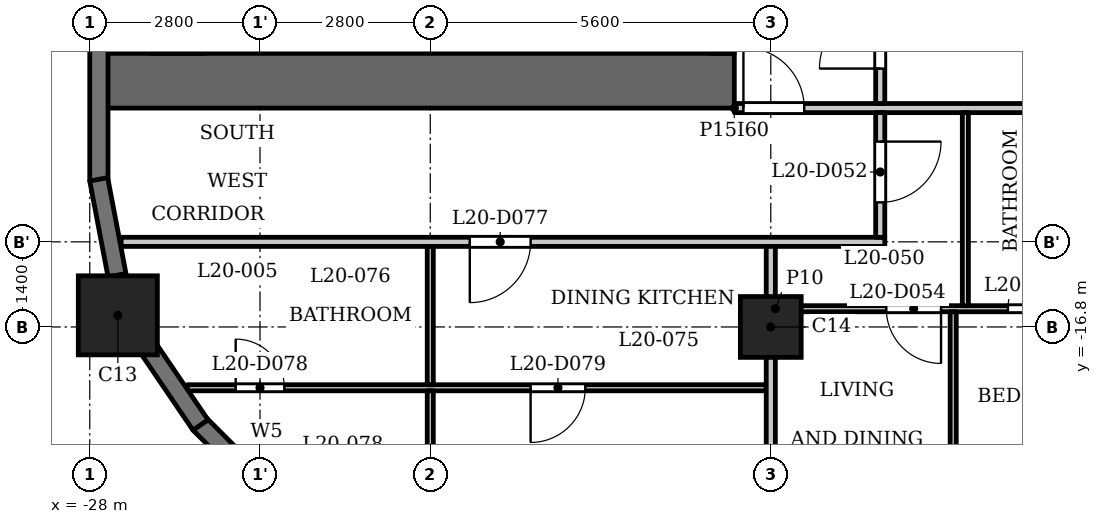
"""IFC4 building model, lengths in metres.
Left out: names, types, materials, properties, quantities, classifications, styles, units other than length and angle.
Written with IfcOpenShell. Run it as: python <this file> out.ifc"""

import sys

from ifc_helpers import new_model, si_unit, direction, frame, frame_2d, origin, origin_2d, place, context, subcontext, project, spatial, rectangle, extrude, element, fill, save


model = new_model("IFC4")
c1 = context("Model", 3, precision=1e-05, world=origin(), true_north=direction((0.0, 1.0)))
c2 = subcontext(c1, "Body", "Model", "MODEL_VIEW")
j1 = project(units=[si_unit("LENGTHUNIT", "METRE"), si_unit("PLANEANGLEUNIT", "RADIAN")], contexts=[c1])
p1 = place(None, origin())
s1 = spatial("IfcSite", under=j1, at=p1, CompositionType="ELEMENT")
p2 = place(p1, origin())
s2 = spatial("IfcBuilding", under=s1, at=p2, CompositionType="ELEMENT")
p3 = place(p2, frame((0.0, 0.0, 83.3)))
s3 = spatial("IfcBuildingStorey", under=s2, at=p3, CompositionType="ELEMENT", Elevation=83.3)
p4 = place(p3, frame((-27.538, -16.609, 0.0), z_axis=(0.0, 0.0, 1.0), x_axis=(1.0, 0.0, 0.0)))
e1 = element("IfcColumn", 1, at=p4, inside=s3, PredefinedType="COLUMN", context=c2, shape_type="SweptSolid", body=[
    extrude(rectangle(XDim=1.3, YDim=1.3, at=origin_2d()), origin(), (0.0, 0.0, 1.0), 3.5),
])
p5 = place(p3, frame((-16.8, -16.8, 0.0), z_axis=(0.0, 0.0, 1.0), x_axis=(1.0, 0.0, 0.0)))
e2 = element("IfcColumn", 2, at=p5, inside=s3, PredefinedType="COLUMN", context=c2, shape_type="SweptSolid", body=[
    extrude(rectangle(XDim=1.0, YDim=1.0, at=origin_2d()), origin(), (0.0, 0.0, 1.0), 3.5),
])
p6 = place(p3, frame((-26.197, -18.391, 0.0), z_axis=(0.0, 0.0, 1.0), x_axis=(0.707058908279, -0.707154650853, 0.0)))
e3 = element("IfcWall", 3, at=p6, inside=s3, PredefinedType="SOLIDWALL", context=c2, shape_type="SweptSolid", body=[
    extrude(rectangle(XDim=2.55, YDim=0.3, at=frame_2d((1.275, 0.0))), origin(), (0.0, 0.0, 1.0), 2.4),
])
p7 = place(p6, frame((0.875, 0.0, 0.6)))
e4 = element("IfcOpeningElement", 4, at=p7, cuts=e3, PredefinedType="OPENING", context=c2, shape_type="SweptSolid", body=[
    extrude(rectangle(XDim=0.8, YDim=1.55, at=frame_2d((0.4, 0.775))), frame((0.0, 0.16, 0.0), z_axis=(0.0, -1.0, 0.0), x_axis=(1.0, 0.0, 0.0)), (0.0, 0.0, 1.0), 0.32),
])
p8 = place(p3, frame((-27.85, -11.85, 0.0), z_axis=(0.0, 0.0, 1.0), x_axis=(0.0, -1.0, 0.0)))
e5 = element("IfcWall", 5, at=p8, inside=s3, PredefinedType="SOLIDWALL", context=c2, shape_type="SweptSolid", body=[
    extrude(rectangle(XDim=2.55, YDim=0.3, at=frame_2d((1.275, 0.0))), origin(), (0.0, 0.0, 1.0), 2.4),
])
for number, where, z_axis, x_axis in (
    (6, (-27.853, -14.372, 0.0), (0.0, 0.0, 1.0), (0.187, -0.982, 0.0)),
    (7, (-27.082, -17.084, 0.0), (0.0, 0.0, 1.0), (0.562, -0.827, 0.0)),
):
    element("IfcWall", number, at=place(p3, frame(where, z_axis=z_axis, x_axis=x_axis)), inside=s3, PredefinedType="SOLIDWALL", context=c2, shape_type="SweptSolid", body=[
        extrude(rectangle(XDim=1.606, YDim=0.3, at=frame_2d((0.803, 0.0))), origin(), (0.0, 0.0, 1.0), 2.4),
    ])
p9 = place(p3, frame((-17.4, -12.75, 0.0), z_axis=(0.0, 0.0, 1.0), x_axis=(-1.0, 0.0, 0.0)))
e8 = element("IfcWall", 8, at=p9, inside=s3, PredefinedType="SHEAR", context=c2, shape_type="SweptSolid", body=[
    extrude(rectangle(XDim=10.4, YDim=0.9, at=frame_2d((5.2, 0.0))), origin(), (0.0, 0.0, 1.0), 3.2),
])
p10 = place(p3, frame((-17.6, -12.3, 0.0), z_axis=(0.0, 0.0, 1.0), x_axis=(0.0, 1.0, 0.0)))
e9 = element("IfcWall", 9, at=p10, inside=s3, PredefinedType="SHEAR", context=c2, shape_type="SweptSolid", body=[
    extrude(rectangle(XDim=24.6, YDim=0.4, at=frame_2d((12.3, 0.0))), origin(), (0.0, 0.0, 1.0), 3.2),
])
p11 = place(p10, frame((6.0, 0.0, 0.0)))
e10 = element("IfcOpeningElement", 10, at=p11, cuts=e9, PredefinedType="OPENING", context=c2, shape_type="SweptSolid", body=[
    extrude(rectangle(XDim=1.1, YDim=2.1, at=frame_2d((0.55, 1.05))), frame((0.0, 0.21, 0.0), z_axis=(0.0, -1.0, 0.0), x_axis=(1.0, 0.0, 0.0)), (0.0, 0.0, 1.0), 0.42),
])
p12 = place(p10, frame((8.4, 0.0, 0.0)))
e11 = element("IfcOpeningElement", 11, at=p12, cuts=e9, PredefinedType="OPENING", context=c2, shape_type="SweptSolid", body=[
    extrude(rectangle(XDim=1.1, YDim=2.1, at=frame_2d((0.55, 1.05))), frame((0.0, 0.21, 0.0), z_axis=(0.0, -1.0, 0.0), x_axis=(1.0, 0.0, 0.0)), (0.0, 0.0, 1.0), 0.42),
])
p13 = place(p10, frame((10.8, 0.0, 0.0)))
e12 = element("IfcOpeningElement", 12, at=p13, cuts=e9, PredefinedType="OPENING", context=c2, shape_type="SweptSolid", body=[
    extrude(rectangle(XDim=1.1, YDim=2.1, at=frame_2d((0.55, 1.05))), frame((0.0, 0.21, 0.0), z_axis=(0.0, -1.0, 0.0), x_axis=(1.0, 0.0, 0.0)), (0.0, 0.0, 1.0), 0.42),
])
p14 = place(p10, frame((16.75, 0.0, 0.0)))
e13 = element("IfcOpeningElement", 13, at=p14, cuts=e9, PredefinedType="OPENING", context=c2, shape_type="SweptSolid", body=[
    extrude(rectangle(XDim=0.9, YDim=2.1, at=frame_2d((0.45, 1.05))), frame((0.0, 0.21, 0.0), z_axis=(0.0, -1.0, 0.0), x_axis=(1.0, 0.0, 0.0)), (0.0, 0.0, 1.0), 0.42),
])
p15 = place(p10, frame((22.8, 0.0, 0.0)))
e14 = element("IfcOpeningElement", 14, at=p15, cuts=e9, PredefinedType="OPENING", context=c2, shape_type="SweptSolid", body=[
    extrude(rectangle(XDim=1.1, YDim=2.1, at=frame_2d((0.55, 1.05))), frame((0.0, 0.21, 0.0), z_axis=(0.0, -1.0, 0.0), x_axis=(1.0, 0.0, 0.0)), (0.0, 0.0, 1.0), 0.42),
])
p16 = place(p10, frame((0.7, 0.0, 0.0)))
e15 = element("IfcOpeningElement", 15, at=p16, cuts=e9, PredefinedType="OPENING", context=c2, shape_type="SweptSolid", body=[
    extrude(rectangle(XDim=1.1, YDim=2.1, at=frame_2d((0.55, 1.05))), frame((0.0, 0.21, 0.0), z_axis=(0.0, -1.0, 0.0), x_axis=(1.0, 0.0, 0.0)), (0.0, 0.0, 1.0), 0.42),
])
p17 = place(p10, frame((12.775, 0.0, 0.0)))
e16 = element("IfcOpeningElement", 16, at=p17, cuts=e9, PredefinedType="OPENING", context=c2, shape_type="SweptSolid", body=[
    extrude(rectangle(XDim=1.8, YDim=2.1, at=frame_2d((0.9, 1.05))), frame((0.0, 0.21, 0.0), z_axis=(0.0, -1.0, 0.0), x_axis=(1.0, 0.0, 0.0)), (0.0, 0.0, 1.0), 0.42),
])
p18 = place(p3, frame((-26.55, -12.3, 0.0), z_axis=(0.0, 0.0, 1.0), x_axis=(0.0, 1.0, 0.0)))
e17 = element("IfcWall", 17, at=p18, inside=s3, PredefinedType="SHEAR", context=c2, shape_type="SweptSolid", body=[
    extrude(rectangle(XDim=24.6, YDim=0.9, at=frame_2d((12.3, 0.0))), origin(), (0.0, 0.0, 1.0), 3.2),
])
p19 = place(p3, frame((-23.55, -12.3, 0.0), z_axis=(0.0, 0.0, 1.0), x_axis=(0.0, 1.0, 0.0)))
e18 = element("IfcWall", 18, at=p19, inside=s3, PredefinedType="PARTITIONING", context=c2, shape_type="SweptSolid", body=[
    extrude(rectangle(XDim=2.5, YDim=0.2, at=frame_2d((1.25, 0.0))), origin(), (0.0, 0.0, 1.0), 3.2),
])
p20 = place(p19, frame((0.8, 0.0, 0.0)))
e19 = element("IfcOpeningElement", 19, at=p20, cuts=e18, PredefinedType="OPENING", context=c2, shape_type="SweptSolid", body=[
    extrude(rectangle(XDim=0.9, YDim=2.1, at=frame_2d((0.45, 1.05))), frame((0.0, 0.11, 0.0), z_axis=(0.0, -1.0, 0.0), x_axis=(1.0, 0.0, 0.0)), (0.0, 0.0, 1.0), 0.22),
])
p21 = place(p3, frame((-26.394, -17.8, 0.0), z_axis=(0.0, 0.0, 1.0), x_axis=(1.0, 0.0, 0.0)))
e20 = element("IfcWall", 20, at=p21, inside=s3, PredefinedType="PARTITIONING", context=c2, shape_type="SweptSolid", body=[
    extrude(rectangle(XDim=9.519, YDim=0.1, at=frame_2d((4.76, 0.0))), origin(), (0.0, 0.0, 1.0), 3.2),
])
p22 = place(p21, frame((0.794, 0.0, 0.0)))
e21 = element("IfcOpeningElement", 21, at=p22, cuts=e20, PredefinedType="OPENING", context=c2, shape_type="SweptSolid", body=[
    extrude(rectangle(XDim=0.8, YDim=2.1, at=frame_2d((0.4, 1.05))), frame((0.0, 0.06, 0.0), z_axis=(0.0, -1.0, 0.0), x_axis=(1.0, 0.0, 0.0)), (0.0, 0.0, 1.0), 0.12),
])
p23 = place(p21, frame((5.644, 0.0, 0.0)))
e22 = element("IfcOpeningElement", 22, at=p23, cuts=e20, PredefinedType="OPENING", context=c2, shape_type="SweptSolid", body=[
    extrude(rectangle(XDim=0.9, YDim=2.1, at=frame_2d((0.45, 1.05))), frame((0.0, 0.06, 0.0), z_axis=(0.0, -1.0, 0.0), x_axis=(1.0, 0.0, 0.0)), (0.0, 0.0, 1.0), 0.12),
])
p24 = place(p3, frame((-16.725, -16.5, 0.0), z_axis=(0.0, 0.0, 1.0), x_axis=(1.0, 0.0, 0.0)))
e23 = element("IfcWall", 23, at=p24, inside=s3, PredefinedType="PARTITIONING", context=c2, shape_type="SweptSolid", body=[
    extrude(rectangle(XDim=33.45, YDim=0.1, at=frame_2d((16.725, 0.0))), origin(), (0.0, 0.0, 1.0), 3.2),
])
p25 = place(p24, frame((3.825, 0.0, 0.0)))
e24 = element("IfcOpeningElement", 24, at=p25, cuts=e23, PredefinedType="OPENING", context=c2, shape_type="SweptSolid", body=[
    extrude(rectangle(XDim=0.8, YDim=2.1, at=frame_2d((0.4, 1.05))), frame((0.0, 0.06, 0.0), z_axis=(0.0, -1.0, 0.0), x_axis=(1.0, 0.0, 0.0)), (0.0, 0.0, 1.0), 0.12),
])
p26 = place(p24, frame((1.825, 0.0, 0.0)))
e25 = element("IfcOpeningElement", 25, at=p26, cuts=e23, PredefinedType="OPENING", context=c2, shape_type="SweptSolid", body=[
    extrude(rectangle(XDim=0.9, YDim=2.1, at=frame_2d((0.45, 1.05))), frame((0.0, 0.06, 0.0), z_axis=(0.0, -1.0, 0.0), x_axis=(1.0, 0.0, 0.0)), (0.0, 0.0, 1.0), 0.12),
])
p27 = place(p24, frame((9.675, 0.0, 0.0)))
e26 = element("IfcOpeningElement", 26, at=p27, cuts=e23, PredefinedType="OPENING", context=c2, shape_type="SweptSolid", body=[
    extrude(rectangle(XDim=0.8, YDim=2.1, at=frame_2d((0.4, 1.05))), frame((0.0, 0.06, 0.0), z_axis=(0.0, -1.0, 0.0), x_axis=(1.0, 0.0, 0.0)), (0.0, 0.0, 1.0), 0.12),
])
p28 = place(p24, frame((6.425, 0.0, 0.0)))
e27 = element("IfcOpeningElement", 27, at=p28, cuts=e23, PredefinedType="OPENING", context=c2, shape_type="SweptSolid", body=[
    extrude(rectangle(XDim=0.9, YDim=2.1, at=frame_2d((0.45, 1.05))), frame((0.0, 0.06, 0.0), z_axis=(0.0, -1.0, 0.0), x_axis=(1.0, 0.0, 0.0)), (0.0, 0.0, 1.0), 0.12),
])
p29 = place(p24, frame((15.275, 0.0, 0.0)))
e28 = element("IfcOpeningElement", 28, at=p29, cuts=e23, PredefinedType="OPENING", context=c2, shape_type="SweptSolid", body=[
    extrude(rectangle(XDim=0.8, YDim=2.1, at=frame_2d((0.4, 1.05))), frame((0.0, 0.06, 0.0), z_axis=(0.0, -1.0, 0.0), x_axis=(1.0, 0.0, 0.0)), (0.0, 0.0, 1.0), 0.12),
])
p30 = place(p24, frame((12.025, 0.0, 0.0)))
e29 = element("IfcOpeningElement", 29, at=p30, cuts=e23, PredefinedType="OPENING", context=c2, shape_type="SweptSolid", body=[
    extrude(rectangle(XDim=0.9, YDim=2.1, at=frame_2d((0.45, 1.05))), frame((0.0, 0.06, 0.0), z_axis=(0.0, -1.0, 0.0), x_axis=(1.0, 0.0, 0.0)), (0.0, 0.0, 1.0), 0.12),
])
p31 = place(p24, frame((20.875, 0.0, 0.0)))
e30 = element("IfcOpeningElement", 30, at=p31, cuts=e23, PredefinedType="OPENING", context=c2, shape_type="SweptSolid", body=[
    extrude(rectangle(XDim=0.8, YDim=2.1, at=frame_2d((0.4, 1.05))), frame((0.0, 0.06, 0.0), z_axis=(0.0, -1.0, 0.0), x_axis=(1.0, 0.0, 0.0)), (0.0, 0.0, 1.0), 0.12),
])
p32 = place(p24, frame((18.625, 0.0, 0.0)))
e31 = element("IfcOpeningElement", 31, at=p32, cuts=e23, PredefinedType="OPENING", context=c2, shape_type="SweptSolid", body=[
    extrude(rectangle(XDim=0.9, YDim=2.1, at=frame_2d((0.45, 1.05))), frame((0.0, 0.06, 0.0), z_axis=(0.0, -1.0, 0.0), x_axis=(1.0, 0.0, 0.0)), (0.0, 0.0, 1.0), 0.12),
])
p33 = place(p24, frame((23.875, 0.0, 0.0)))
e32 = element("IfcOpeningElement", 32, at=p33, cuts=e23, PredefinedType="OPENING", context=c2, shape_type="SweptSolid", body=[
    extrude(rectangle(XDim=0.8, YDim=2.1, at=frame_2d((0.4, 1.05))), frame((0.0, 0.06, 0.0), z_axis=(0.0, -1.0, 0.0), x_axis=(1.0, 0.0, 0.0)), (0.0, 0.0, 1.0), 0.12),
])
p34 = place(p24, frame((26.225, 0.0, 0.0)))
e33 = element("IfcOpeningElement", 33, at=p34, cuts=e23, PredefinedType="OPENING", context=c2, shape_type="SweptSolid", body=[
    extrude(rectangle(XDim=0.9, YDim=2.1, at=frame_2d((0.45, 1.05))), frame((0.0, 0.06, 0.0), z_axis=(0.0, -1.0, 0.0), x_axis=(1.0, 0.0, 0.0)), (0.0, 0.0, 1.0), 0.12),
])
p35 = place(p24, frame((28.575, 0.0, 0.0)))
e34 = element("IfcOpeningElement", 34, at=p35, cuts=e23, PredefinedType="OPENING", context=c2, shape_type="SweptSolid", body=[
    extrude(rectangle(XDim=0.9, YDim=2.1, at=frame_2d((0.45, 1.05))), frame((0.0, 0.06, 0.0), z_axis=(0.0, -1.0, 0.0), x_axis=(1.0, 0.0, 0.0)), (0.0, 0.0, 1.0), 0.12),
])
p36 = place(p24, frame((30.675, 0.0, 0.0)))
e35 = element("IfcOpeningElement", 35, at=p36, cuts=e23, PredefinedType="OPENING", context=c2, shape_type="SweptSolid", body=[
    extrude(rectangle(XDim=0.9, YDim=2.1, at=frame_2d((0.45, 1.05))), frame((0.0, 0.06, 0.0), z_axis=(0.0, -1.0, 0.0), x_axis=(1.0, 0.0, 0.0)), (0.0, 0.0, 1.0), 0.12),
])
p37 = place(p3, frame((-27.484, -15.4, 0.0), z_axis=(0.0, 0.0, 1.0), x_axis=(1.0, 0.0, 0.0)))
e36 = element("IfcWall", 36, at=p37, inside=s3, PredefinedType="PARTITIONING", context=c2, shape_type="SweptSolid", body=[
    extrude(rectangle(XDim=12.559, YDim=0.15, at=frame_2d((6.279, 0.0))), origin(), (0.0, 0.0, 1.0), 3.2),
])
p38 = place(p37, frame((5.734, 0.0, 0.0)))
e37 = element("IfcOpeningElement", 37, at=p38, cuts=e36, PredefinedType="OPENING", context=c2, shape_type="SweptSolid", body=[
    extrude(rectangle(XDim=1.0, YDim=2.1, at=frame_2d((0.5, 1.05))), frame((0.0, 0.085, 0.0), z_axis=(0.0, -1.0, 0.0), x_axis=(1.0, 0.0, 0.0)), (0.0, 0.0, 1.0), 0.17),
])
p39 = place(p3, frame((-17.4, -13.2, 0.0), z_axis=(0.0, 0.0, 1.0), x_axis=(1.0, 0.0, 0.0)))
e38 = element("IfcWall", 38, at=p39, inside=s3, PredefinedType="PARTITIONING", context=c2, shape_type="SweptSolid", body=[
    extrude(rectangle(XDim=34.8, YDim=0.15, at=frame_2d((17.4, 0.0))), origin(), (0.0, 0.0, 1.0), 3.2),
])
p40 = place(p39, frame((0.15, 0.0, 0.0)))
e39 = element("IfcOpeningElement", 39, at=p40, cuts=e38, PredefinedType="OPENING", context=c2, shape_type="SweptSolid", body=[
    extrude(rectangle(XDim=1.0, YDim=2.1, at=frame_2d((0.5, 1.05))), frame((0.0, 0.085, 0.0), z_axis=(0.0, -1.0, 0.0), x_axis=(1.0, 0.0, 0.0)), (0.0, 0.0, 1.0), 0.17),
])
p41 = place(p39, frame((33.55, 0.0, 0.0)))
e40 = element("IfcOpeningElement", 40, at=p41, cuts=e38, PredefinedType="OPENING", context=c2, shape_type="SweptSolid", body=[
    extrude(rectangle(XDim=1.0, YDim=2.1, at=frame_2d((0.5, 1.05))), frame((0.0, 0.085, 0.0), z_axis=(0.0, -1.0, 0.0), x_axis=(1.0, 0.0, 0.0)), (0.0, 0.0, 1.0), 0.17),
])
p42 = place(p39, frame((7.35, 0.0, 0.0)))
e41 = element("IfcOpeningElement", 41, at=p42, cuts=e38, PredefinedType="OPENING", context=c2, shape_type="SweptSolid", body=[
    extrude(rectangle(XDim=1.0, YDim=2.1, at=frame_2d((0.5, 1.05))), frame((0.0, 0.085, 0.0), z_axis=(0.0, -1.0, 0.0), x_axis=(1.0, 0.0, 0.0)), (0.0, 0.0, 1.0), 0.17),
])
p43 = place(p39, frame((13.7, 0.0, 0.0)))
e42 = element("IfcOpeningElement", 42, at=p43, cuts=e38, PredefinedType="OPENING", context=c2, shape_type="SweptSolid", body=[
    extrude(rectangle(XDim=1.0, YDim=2.1, at=frame_2d((0.5, 1.05))), frame((0.0, 0.085, 0.0), z_axis=(0.0, -1.0, 0.0), x_axis=(1.0, 0.0, 0.0)), (0.0, 0.0, 1.0), 0.17),
])
p44 = place(p39, frame((19.3, 0.0, 0.0)))
e43 = element("IfcOpeningElement", 43, at=p44, cuts=e38, PredefinedType="OPENING", context=c2, shape_type="SweptSolid", body=[
    extrude(rectangle(XDim=1.0, YDim=2.1, at=frame_2d((0.5, 1.05))), frame((0.0, 0.085, 0.0), z_axis=(0.0, -1.0, 0.0), x_axis=(1.0, 0.0, 0.0)), (0.0, 0.0, 1.0), 0.17),
])
p45 = place(p3, frame((-22.4, -21.72, 0.0), z_axis=(0.0, 0.0, 1.0), x_axis=(0.0, 1.0, 0.0)))
e44 = element("IfcWall", 44, at=p45, inside=s3, PredefinedType="PARTITIONING", context=c2, shape_type="SweptSolid", body=[
    extrude(rectangle(XDim=3.87, YDim=0.1, at=frame_2d((1.935, 0.0))), origin(), (0.0, 0.0, 1.0), 3.2),
])
p46 = place(p45, frame((1.87, 0.0, 0.0)))
e45 = element("IfcOpeningElement", 45, at=p46, cuts=e44, PredefinedType="OPENING", context=c2, shape_type="SweptSolid", body=[
    extrude(rectangle(XDim=0.9, YDim=2.1, at=frame_2d((0.45, 1.05))), frame((0.0, 0.06, 0.0), z_axis=(0.0, -1.0, 0.0), x_axis=(1.0, 0.0, 0.0)), (0.0, 0.0, 1.0), 0.12),
])
p47 = place(p3, frame((-22.4, -17.75, 0.0), z_axis=(0.0, 0.0, 1.0), x_axis=(0.0, 1.0, 0.0)))
e46 = element("IfcWall", 46, at=p47, inside=s3, PredefinedType="PARTITIONING", context=c2, shape_type="SweptSolid", body=[
    extrude(rectangle(XDim=2.275, YDim=0.1, at=frame_2d((1.137, 0.0))), origin(), (0.0, 0.0, 1.0), 3.2),
])
p48 = place(p3, frame((-16.8, -23.03, 0.0), z_axis=(0.0, 0.0, 1.0), x_axis=(0.0, 1.0, 0.0)))
e47 = element("IfcWall", 47, at=p48, inside=s3, PredefinedType="PARTITIONING", context=c2, shape_type="SweptSolid", body=[
    extrude(rectangle(XDim=7.555, YDim=0.15, at=frame_2d((3.777, 0.0))), origin(), (0.0, 0.0, 1.0), 3.2),
])
p49 = place(p3, frame((-15.0, -15.325, 0.0), z_axis=(0.0, 0.0, 1.0), x_axis=(0.0, 1.0, 0.0)))
e48 = element("IfcWall", 48, at=p49, inside=s3, PredefinedType="PARTITIONING", context=c2, shape_type="SweptSolid", body=[
    extrude(rectangle(XDim=2.05, YDim=0.15, at=frame_2d((1.025, 0.0))), origin(), (0.0, 0.0, 1.0), 3.2),
])
p50 = place(p49, frame((0.574, 0.0, 0.0)))
e49 = element("IfcOpeningElement", 49, at=p50, cuts=e48, PredefinedType="OPENING", context=c2, shape_type="SweptSolid", body=[
    extrude(rectangle(XDim=1.0, YDim=2.1, at=frame_2d((0.5, 1.05))), frame((0.0, 0.085, 0.0), z_axis=(0.0, -1.0, 0.0), x_axis=(1.0, 0.0, 0.0)), (0.0, 0.0, 1.0), 0.17),
])
p51 = place(p3, frame((-15.0, -13.125, 0.0), z_axis=(0.0, 0.0, 1.0), x_axis=(0.0, 1.0, 0.0)))
e50 = element("IfcWall", 50, at=p51, inside=s3, PredefinedType="PARTITIONING", context=c2, shape_type="SweptSolid", body=[
    extrude(rectangle(XDim=6.356, YDim=0.15, at=frame_2d((3.178, 0.0))), origin(), (0.0, 0.0, 1.0), 3.2),
])
p52 = place(p51, frame((0.575, 0.0, 0.0)))
e51 = element("IfcOpeningElement", 51, at=p52, cuts=e50, PredefinedType="OPENING", context=c2, shape_type="SweptSolid", body=[
    extrude(rectangle(XDim=1.0, YDim=2.1, at=frame_2d((0.5, 1.05))), frame((0.0, 0.085, 0.0), z_axis=(0.0, -1.0, 0.0), x_axis=(1.0, 0.0, 0.0)), (0.0, 0.0, 1.0), 0.17),
])
p53 = place(p3, frame((-13.8, -22.08, 0.0), z_axis=(0.0, 0.0, 1.0), x_axis=(0.0, 1.0, 0.0)))
e52 = element("IfcWall", 52, at=p53, inside=s3, PredefinedType="PARTITIONING", context=c2, shape_type="SweptSolid", body=[
    extrude(rectangle(XDim=5.53, YDim=0.1, at=frame_2d((2.765, 0.0))), origin(), (0.0, 0.0, 1.0), 3.2),
])
p54 = place(p53, frame((0.42, 0.0, 0.0)))
e53 = element("IfcOpeningElement", 53, at=p54, cuts=e52, PredefinedType="OPENING", context=c2, shape_type="SweptSolid", body=[
    extrude(rectangle(XDim=0.9, YDim=2.1, at=frame_2d((0.45, 1.05))), frame((0.0, 0.06, 0.0), z_axis=(0.0, -1.0, 0.0), x_axis=(1.0, 0.0, 0.0)), (0.0, 0.0, 1.0), 0.12),
])
p55 = place(p3, frame((-13.6, -16.45, 0.0), z_axis=(0.0, 0.0, 1.0), x_axis=(0.0, 1.0, 0.0)))
e54 = element("IfcWall", 54, at=p55, inside=s3, PredefinedType="PARTITIONING", context=c2, shape_type="SweptSolid", body=[
    extrude(rectangle(XDim=3.175, YDim=0.1, at=frame_2d((1.587, 0.0))), origin(), (0.0, 0.0, 1.0), 3.2),
])
p56 = place(p52, origin())
e55 = element("IfcDoor", 55, at=p56, inside=s3, OperationType="SINGLE_SWING_RIGHT", PredefinedType="DOOR", context=c2, shape_type="SweptSolid", body=[
    extrude(rectangle(XDim=1.0, YDim=2.1, at=frame_2d((0.5, 1.05))), frame((0.0, 0.025, 0.0), z_axis=(0.0, -1.0, 0.0), x_axis=(1.0, 0.0, 0.0)), (0.0, 0.0, 1.0), 0.05),
])
fill(e51, e55)
p57 = place(p40, origin())
e56 = element("IfcDoor", 56, at=p57, inside=s3, OperationType="SINGLE_SWING_RIGHT", PredefinedType="DOOR", context=c2, shape_type="SweptSolid", body=[
    extrude(rectangle(XDim=1.0, YDim=2.1, at=frame_2d((0.5, 1.05))), frame((0.0, 0.025, 0.0), z_axis=(0.0, -1.0, 0.0), x_axis=(1.0, 0.0, 0.0)), (0.0, 0.0, 1.0), 0.05),
])
fill(e39, e56)
p58 = place(p50, origin())
e57 = element("IfcDoor", 57, at=p58, inside=s3, OperationType="SINGLE_SWING_RIGHT", PredefinedType="DOOR", context=c2, shape_type="SweptSolid", body=[
    extrude(rectangle(XDim=1.0, YDim=2.1, at=frame_2d((0.5, 1.05))), frame((0.0, 0.025, 0.0), z_axis=(0.0, -1.0, 0.0), x_axis=(1.0, 0.0, 0.0)), (0.0, 0.0, 1.0), 0.05),
])
fill(e49, e57)
p59 = place(p25, origin())
e58 = element("IfcDoor", 58, at=p59, inside=s3, OperationType="SINGLE_SWING_LEFT", PredefinedType="DOOR", context=c2, shape_type="SweptSolid", body=[
    extrude(rectangle(XDim=0.8, YDim=2.1, at=frame_2d((0.4, 1.05))), frame((0.0, 0.025, 0.0), z_axis=(0.0, -1.0, 0.0), x_axis=(1.0, 0.0, 0.0)), (0.0, 0.0, 1.0), 0.05),
])
fill(e24, e58)
p60 = place(p26, origin())
e59 = element("IfcDoor", 59, at=p60, inside=s3, OperationType="SINGLE_SWING_RIGHT", PredefinedType="DOOR", context=c2, shape_type="SweptSolid", body=[
    extrude(rectangle(XDim=0.9, YDim=2.1, at=frame_2d((0.45, 1.05))), frame((0.0, 0.025, 0.0), z_axis=(0.0, -1.0, 0.0), x_axis=(1.0, 0.0, 0.0)), (0.0, 0.0, 1.0), 0.05),
])
fill(e25, e59)
p61 = place(p38, origin())
e60 = element("IfcDoor", 60, at=p61, inside=s3, OperationType="SINGLE_SWING_LEFT", PredefinedType="DOOR", context=c2, shape_type="SweptSolid", body=[
    extrude(rectangle(XDim=1.0, YDim=2.1, at=frame_2d((0.5, 1.05))), frame((0.0, 0.025, 0.0), z_axis=(0.0, -1.0, 0.0), x_axis=(1.0, 0.0, 0.0)), (0.0, 0.0, 1.0), 0.05),
])
fill(e37, e60)
p62 = place(p22, origin())
e61 = element("IfcDoor", 61, at=p62, inside=s3, OperationType="SINGLE_SWING_RIGHT", PredefinedType="DOOR", context=c2, shape_type="SweptSolid", body=[
    extrude(rectangle(XDim=0.8, YDim=2.1, at=frame_2d((0.4, 1.05))), frame((0.0, 0.025, 0.0), z_axis=(0.0, -1.0, 0.0), x_axis=(1.0, 0.0, 0.0)), (0.0, 0.0, 1.0), 0.05),
])
fill(e21, e61)
p63 = place(p23, origin())
e62 = element("IfcDoor", 62, at=p63, inside=s3, OperationType="SINGLE_SWING_LEFT", PredefinedType="DOOR", context=c2, shape_type="SweptSolid", body=[
    extrude(rectangle(XDim=0.9, YDim=2.1, at=frame_2d((0.45, 1.05))), frame((0.0, 0.025, 0.0), z_axis=(0.0, -1.0, 0.0), x_axis=(1.0, 0.0, 0.0)), (0.0, 0.0, 1.0), 0.05),
])
fill(e22, e62)
save(model, sys.argv[1])
